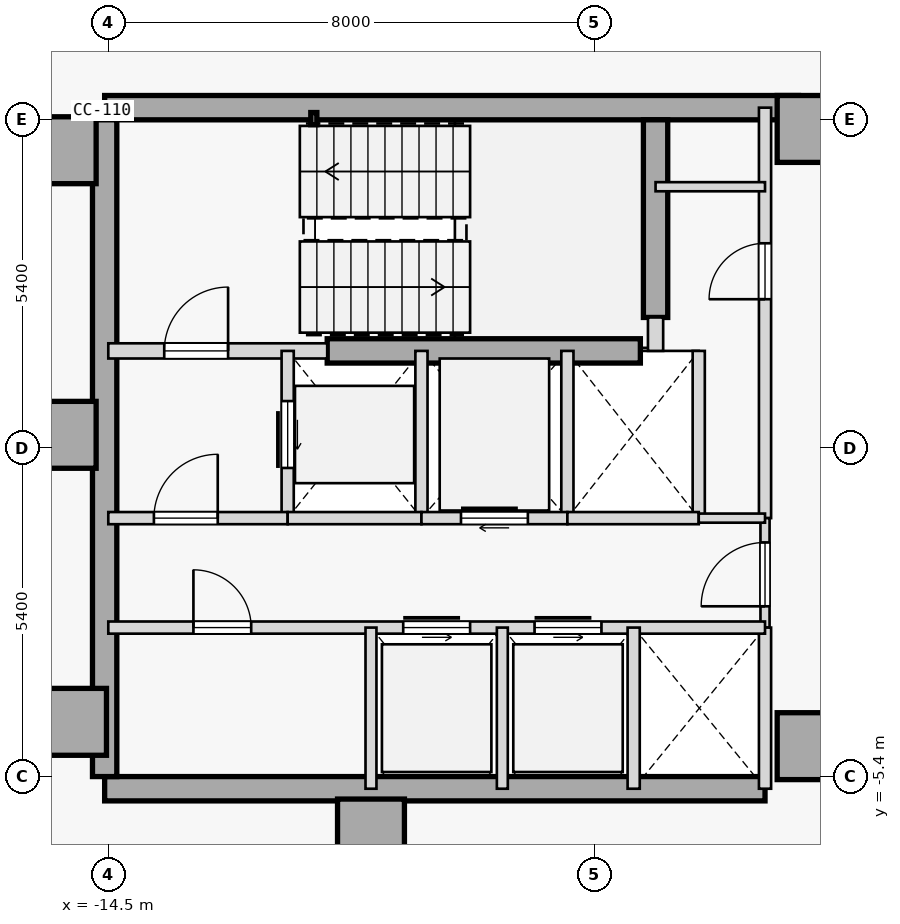
"""IFC4 building model, lengths in metres.
Left out: names, types, materials, properties, quantities, classifications, styles, units other than length and angle.
Written with IfcOpenShell. Run it as: python <this file> out.ifc"""

import sys

from ifc_helpers import new_model, si_unit, direction, frame, frame_2d, origin, origin_2d, place, context, subcontext, project, spatial, rectangle, hollow_rectangle, extrude, element, fill, save


model = new_model("IFC4")
c1 = context("Model", 3, precision=1e-05, world=origin(), true_north=direction((0.0, 1.0)))
c2 = subcontext(c1, "Body", "Model", "MODEL_VIEW")
j1 = project(units=[si_unit("LENGTHUNIT", "METRE"), si_unit("PLANEANGLEUNIT", "RADIAN")], contexts=[c1])
p1 = place(None, origin())
s1 = spatial("IfcSite", under=j1, at=p1, CompositionType="ELEMENT")
p2 = place(p1, origin())
s2 = spatial("IfcBuilding", under=s1, at=p2, CompositionType="ELEMENT")
p3 = place(p2, frame((0.0, 0.0, 135.5)))
s3 = spatial("IfcBuildingStorey", under=s2, at=p3, CompositionType="ELEMENT", Elevation=135.5)
for number, where, z_axis, x_axis in (
    (1, (-15.25, 4.9, 0.0), (0.0, 0.0, 1.0), (1.0, 0.0, 0.0)),
    (2, (-15.25, 0.22, 0.0), (0.0, 0.0, 1.0), (1.0, 0.0, 0.0)),
    (3, (-15.08, -4.5, 0.0), (0.0, 0.0, 1.0), (1.0, 0.0, 0.0)),
    (4, (-10.18, -6.32, 0.0), (0.0, 0.0, 1.0), (1.0, 0.0, 0.0)),
    (5, (-2.95, -4.9, 0.0), (0.0, 0.0, 1.0), (1.0, 0.0, 0.0)),
    (6, (-2.95, 5.25, 0.0), (0.0, 0.0, 1.0), (1.0, 0.0, 0.0)),
):
    element("IfcColumn", number, at=place(p3, frame(where, z_axis=z_axis, x_axis=x_axis)), inside=s3, PredefinedType="COLUMN", context=c2, shape_type="SweptSolid", body=[
        extrude(rectangle(XDim=1.1, YDim=1.1, at=origin_2d()), origin(), (0.0, 0.0, 1.0), 3.7),
    ])
p4 = place(p3, frame((-14.56, 5.6, 0.0), z_axis=(0.0, 0.0, 1.0), x_axis=(1.0, 0.0, 0.0)))
e7 = element("IfcWall", 7, at=p4, inside=s3, PredefinedType="SHEAR", context=c2, shape_type="SweptSolid", body=[
    extrude(rectangle(XDim=11.41, YDim=0.4, at=frame_2d((5.705, 0.0))), origin(), (0.0, 0.0, 1.0), 3.475),
])
p5 = place(p3, frame((-14.56, -5.6, 0.0), z_axis=(0.0, 0.0, 1.0), x_axis=(1.0, 0.0, 0.0)))
e8 = element("IfcWall", 8, at=p5, inside=s3, PredefinedType="SHEAR", context=c2, shape_type="SweptSolid", body=[
    extrude(rectangle(XDim=10.86, YDim=0.4, at=frame_2d((5.43, 0.0))), origin(), (0.0, 0.0, 1.0), 3.475),
])
p6 = place(p3, frame((-14.56, -5.4, 0.0), z_axis=(0.0, 0.0, 1.0), x_axis=(0.0, 1.0, 0.0)))
e9 = element("IfcWall", 9, at=p6, inside=s3, PredefinedType="SHEAR", context=c2, shape_type="SweptSolid", body=[
    extrude(rectangle(XDim=10.8, YDim=0.4, at=frame_2d((5.4, 0.0))), origin(), (0.0, 0.0, 1.0), 3.475),
])
p7 = place(p3, frame((-5.5, 2.15, 0.0), z_axis=(0.0, 0.0, 1.0), x_axis=(0.0, 1.0, 0.0)))
e10 = element("IfcWall", 10, at=p7, inside=s3, PredefinedType="SHEAR", context=c2, shape_type="SweptSolid", body=[
    extrude(rectangle(XDim=3.25, YDim=0.4, at=frame_2d((1.625, 0.0))), origin(), (0.0, 0.0, 1.0), 3.475),
])
p8 = place(p3, frame((-10.9, 1.6, 0.0), z_axis=(0.0, 0.0, 1.0), x_axis=(1.0, 0.0, 0.0)))
e11 = element("IfcWall", 11, at=p8, inside=s3, PredefinedType="SHEAR", context=c2, shape_type="SweptSolid", body=[
    extrude(rectangle(XDim=5.15, YDim=0.4, at=frame_2d((2.575, 0.0))), origin(), (0.0, 0.0, 1.0), 3.475),
])
p9 = place(p3, frame((-11.12, 5.42, 0.0), z_axis=(0.0, 0.0, 1.0), x_axis=(1.0, 0.0, 0.0)))
e12 = element("IfcColumn", 12, at=p9, inside=s3, PredefinedType="COLUMN", context=c2, shape_type="SweptSolid", body=[
    extrude(hollow_rectangle(XDim=0.1, YDim=0.2, WallThickness=0.008, at=origin_2d()), origin(), (0.0, 0.0, 1.0), 3.7),
])
p10 = place(p3, frame((-14.5, 1.6, 0.0), z_axis=(0.0, 0.0, 1.0), x_axis=(1.0, 0.0, 0.0)))
e13 = element("IfcWall", 13, at=p10, inside=s3, PredefinedType="STANDARD", context=c2, shape_type="SweptSolid", body=[
    extrude(rectangle(XDim=3.6, YDim=0.25, at=frame_2d((1.8, 0.0))), origin(), (0.0, 0.0, 1.0), 3.475),
])
p11 = place(p10, frame((0.92, 0.0, 0.0)))
e14 = element("IfcOpeningElement", 14, at=p11, cuts=e13, PredefinedType="OPENING", context=c2, shape_type="SweptSolid", body=[
    extrude(rectangle(XDim=1.05, YDim=2.15, at=frame_2d((0.525, 1.075))), frame((0.0, 0.135, 0.0), z_axis=(0.0, -1.0, 0.0), x_axis=(1.0, 0.0, 0.0)), (0.0, 0.0, 1.0), 0.27),
])
p12 = place(p3, frame((-5.5, 1.6, 0.0), z_axis=(0.0, 0.0, 1.0), x_axis=(0.0, 1.0, 0.0)))
e15 = element("IfcWall", 15, at=p12, inside=s3, PredefinedType="STANDARD", context=c2, shape_type="SweptSolid", body=[
    extrude(rectangle(XDim=0.55, YDim=0.25, at=frame_2d((0.275, 0.0))), origin(), (0.0, 0.0, 1.0), 3.475),
])
p13 = place(p3, frame((-3.7, -1.15, 0.0), z_axis=(0.0, 0.0, 1.0), x_axis=(0.0, 1.0, 0.0)))
e16 = element("IfcWall", 16, at=p13, inside=s3, PredefinedType="STANDARD", context=c2, shape_type="SweptSolid", body=[
    extrude(rectangle(XDim=6.75, YDim=0.2, at=frame_2d((3.375, 0.0))), origin(), (0.0, 0.0, 1.0), 3.475),
])
p14 = place(p13, frame((3.6, 0.0, 0.0)))
e17 = element("IfcOpeningElement", 17, at=p14, cuts=e16, PredefinedType="OPENING", context=c2, shape_type="SweptSolid", body=[
    extrude(rectangle(XDim=0.92, YDim=2.15, at=frame_2d((0.46, 1.075))), frame((0.0, 0.11, 0.0), z_axis=(0.0, -1.0, 0.0), x_axis=(1.0, 0.0, 0.0)), (0.0, 0.0, 1.0), 0.22),
])
p15 = place(p3, frame((-3.7, -2.95, 0.0), z_axis=(0.0, 0.0, 1.0), x_axis=(0.0, 1.0, 0.0)))
e18 = element("IfcWall", 18, at=p15, inside=s3, PredefinedType="PARTITIONING", context=c2, shape_type="SweptSolid", body=[
    extrude(rectangle(XDim=1.8, YDim=0.15, at=frame_2d((0.9, 0.0))), origin(), (0.0, 0.0, 1.0), 3.475),
])
p16 = place(p15, frame((0.35, 0.0, 0.0)))
e19 = element("IfcOpeningElement", 19, at=p16, cuts=e18, PredefinedType="OPENING", context=c2, shape_type="SweptSolid", body=[
    extrude(rectangle(XDim=1.05, YDim=2.18, at=frame_2d((0.525, 1.09))), frame((0.0, 0.085, 0.0), z_axis=(0.0, -1.0, 0.0), x_axis=(1.0, 0.0, 0.0)), (0.0, 0.0, 1.0), 0.17),
])
p17 = place(p3, frame((-3.7, -5.6, 0.0), z_axis=(0.0, 0.0, 1.0), x_axis=(0.0, 1.0, 0.0)))
e20 = element("IfcWall", 20, at=p17, inside=s3, PredefinedType="STANDARD", context=c2, shape_type="SweptSolid", body=[
    extrude(rectangle(XDim=2.65, YDim=0.2, at=frame_2d((1.325, 0.0))), origin(), (0.0, 0.0, 1.0), 3.475),
])
p18 = place(p3, frame((-11.55, -1.15, 0.0), z_axis=(0.0, 0.0, 1.0), x_axis=(0.0, 1.0, 0.0)))
e21 = element("IfcWall", 21, at=p18, inside=s3, PredefinedType="STANDARD", context=c2, shape_type="SweptSolid", body=[
    extrude(rectangle(XDim=2.75, YDim=0.2, at=frame_2d((1.375, 0.0))), origin(), (0.0, 0.0, 1.0), 3.475),
])
p19 = place(p18, frame((0.825, 0.0, 0.0)))
e22 = element("IfcOpeningElement", 22, at=p19, cuts=e21, PredefinedType="OPENING", context=c2, shape_type="SweptSolid", body=[
    extrude(rectangle(XDim=1.1, YDim=2.15, at=frame_2d((0.55, 1.075))), frame((0.0, 0.11, 0.0), z_axis=(0.0, -1.0, 0.0), x_axis=(1.0, 0.0, 0.0)), (0.0, 0.0, 1.0), 0.22),
])
p20 = place(p3, frame((-9.35, -1.15, 0.0), z_axis=(0.0, 0.0, 1.0), x_axis=(0.0, 1.0, 0.0)))
e23 = element("IfcWall", 23, at=p20, inside=s3, PredefinedType="STANDARD", context=c2, shape_type="SweptSolid", body=[
    extrude(rectangle(XDim=2.75, YDim=0.2, at=frame_2d((1.375, 0.0))), origin(), (0.0, 0.0, 1.0), 3.475),
])
p21 = place(p3, frame((-14.5, -1.15, 0.0), z_axis=(0.0, 0.0, 1.0), x_axis=(1.0, 0.0, 0.0)))
e24 = element("IfcWall", 24, at=p21, inside=s3, PredefinedType="STANDARD", context=c2, shape_type="SweptSolid", body=[
    extrude(rectangle(XDim=2.95, YDim=0.2, at=frame_2d((1.475, 0.0))), origin(), (0.0, 0.0, 1.0), 3.475),
])
p22 = place(p21, frame((0.75, 0.0, 0.0)))
e25 = element("IfcOpeningElement", 25, at=p22, cuts=e24, PredefinedType="OPENING", context=c2, shape_type="SweptSolid", body=[
    extrude(rectangle(XDim=1.05, YDim=2.18, at=frame_2d((0.525, 1.09))), frame((0.0, 0.11, 0.0), z_axis=(0.0, -1.0, 0.0), x_axis=(1.0, 0.0, 0.0)), (0.0, 0.0, 1.0), 0.22),
])
p23 = place(p3, frame((-11.55, -1.15, 0.0), z_axis=(0.0, 0.0, 1.0), x_axis=(1.0, 0.0, 0.0)))
e26 = element("IfcWall", 26, at=p23, inside=s3, PredefinedType="STANDARD", context=c2, shape_type="SweptSolid", body=[
    extrude(rectangle(XDim=2.2, YDim=0.2, at=frame_2d((1.1, 0.0))), origin(), (0.0, 0.0, 1.0), 3.475),
])
p24 = place(p3, frame((-6.95, -1.15, 0.0), z_axis=(0.0, 0.0, 1.0), x_axis=(0.0, 1.0, 0.0)))
e27 = element("IfcWall", 27, at=p24, inside=s3, PredefinedType="STANDARD", context=c2, shape_type="SweptSolid", body=[
    extrude(rectangle(XDim=2.75, YDim=0.2, at=frame_2d((1.375, 0.0))), origin(), (0.0, 0.0, 1.0), 3.475),
])
p25 = place(p3, frame((-9.35, -1.15, 0.0), z_axis=(0.0, 0.0, 1.0), x_axis=(1.0, 0.0, 0.0)))
e28 = element("IfcWall", 28, at=p25, inside=s3, PredefinedType="STANDARD", context=c2, shape_type="SweptSolid", body=[
    extrude(rectangle(XDim=2.4, YDim=0.2, at=frame_2d((1.2, 0.0))), origin(), (0.0, 0.0, 1.0), 3.475),
])
p26 = place(p25, frame((0.65, 0.0, 0.0)))
e29 = element("IfcOpeningElement", 29, at=p26, cuts=e28, PredefinedType="OPENING", context=c2, shape_type="SweptSolid", body=[
    extrude(rectangle(XDim=1.1, YDim=2.15, at=frame_2d((0.55, 1.075))), frame((0.0, 0.11, 0.0), z_axis=(0.0, -1.0, 0.0), x_axis=(1.0, 0.0, 0.0)), (0.0, 0.0, 1.0), 0.22),
])
p27 = place(p3, frame((-4.79, -1.15, 0.0), z_axis=(0.0, 0.0, 1.0), x_axis=(0.0, 1.0, 0.0)))
e30 = element("IfcWall", 30, at=p27, inside=s3, PredefinedType="STANDARD", context=c2, shape_type="SweptSolid", body=[
    extrude(rectangle(XDim=2.75, YDim=0.2, at=frame_2d((1.375, 0.0))), origin(), (0.0, 0.0, 1.0), 3.475),
])
p28 = place(p3, frame((-6.95, -1.15, 0.0), z_axis=(0.0, 0.0, 1.0), x_axis=(1.0, 0.0, 0.0)))
e31 = element("IfcWall", 31, at=p28, inside=s3, PredefinedType="STANDARD", context=c2, shape_type="SweptSolid", body=[
    extrude(rectangle(XDim=2.16, YDim=0.2, at=frame_2d((1.08, 0.0))), origin(), (0.0, 0.0, 1.0), 3.475),
])
p29 = place(p3, frame((-4.79, -1.15, 0.0), z_axis=(0.0, 0.0, 1.0), x_axis=(1.0, 0.0, 0.0)))
e32 = element("IfcWall", 32, at=p29, inside=s3, PredefinedType="PARTITIONING", context=c2, shape_type="SweptSolid", body=[
    extrude(rectangle(XDim=1.09, YDim=0.15, at=frame_2d((0.545, 0.0))), origin(), (0.0, 0.0, 1.0), 3.475),
])
p30 = place(p3, frame((-14.5, -2.95, 0.0), z_axis=(0.0, 0.0, 1.0), x_axis=(1.0, 0.0, 0.0)))
e33 = element("IfcWall", 33, at=p30, inside=s3, PredefinedType="STANDARD", context=c2, shape_type="SweptSolid", body=[
    extrude(rectangle(XDim=10.8, YDim=0.2, at=frame_2d((5.4, 0.0))), origin(), (0.0, 0.0, 1.0), 3.475),
])
p31 = place(p30, frame((4.85, 0.0, 0.0)))
e34 = element("IfcOpeningElement", 34, at=p31, cuts=e33, PredefinedType="OPENING", context=c2, shape_type="SweptSolid", body=[
    extrude(rectangle(XDim=1.1, YDim=2.15, at=frame_2d((0.55, 1.075))), frame((0.0, 0.11, 0.0), z_axis=(0.0, -1.0, 0.0), x_axis=(1.0, 0.0, 0.0)), (0.0, 0.0, 1.0), 0.22),
])
p32 = place(p30, frame((7.01, 0.0, 0.0)))
e35 = element("IfcOpeningElement", 35, at=p32, cuts=e33, PredefinedType="OPENING", context=c2, shape_type="SweptSolid", body=[
    extrude(rectangle(XDim=1.1, YDim=2.15, at=frame_2d((0.55, 1.075))), frame((0.0, 0.11, 0.0), z_axis=(0.0, -1.0, 0.0), x_axis=(1.0, 0.0, 0.0)), (0.0, 0.0, 1.0), 0.22),
])
p33 = place(p30, frame((1.4, 0.0, 0.0)))
e36 = element("IfcOpeningElement", 36, at=p33, cuts=e33, PredefinedType="OPENING", context=c2, shape_type="SweptSolid", body=[
    extrude(rectangle(XDim=0.95, YDim=2.15, at=frame_2d((0.475, 1.075))), frame((0.0, 0.11, 0.0), z_axis=(0.0, -1.0, 0.0), x_axis=(1.0, 0.0, 0.0)), (0.0, 0.0, 1.0), 0.22),
])
p34 = place(p3, frame((-5.86, -5.6, 0.0), z_axis=(0.0, 0.0, 1.0), x_axis=(0.0, 1.0, 0.0)))
e37 = element("IfcWall", 37, at=p34, inside=s3, PredefinedType="STANDARD", context=c2, shape_type="SweptSolid", body=[
    extrude(rectangle(XDim=2.65, YDim=0.2, at=frame_2d((1.325, 0.0))), origin(), (0.0, 0.0, 1.0), 3.475),
])
for number, where, z_axis, x_axis in (
    (38, (-10.18, -5.6, 0.0), (0.0, 0.0, 1.0), (0.0, 1.0, 0.0)),
    (39, (-8.02, -5.6, 0.0), (0.0, 0.0, 1.0), (0.0, 1.0, 0.0)),
):
    element("IfcWall", number, at=place(p3, frame(where, z_axis=z_axis, x_axis=x_axis)), inside=s3, PredefinedType="STANDARD", context=c2, shape_type="SweptSolid", body=[
        extrude(rectangle(XDim=2.65, YDim=0.18, at=frame_2d((1.325, 0.0))), origin(), (0.0, 0.0, 1.0), 3.475),
    ])
p35 = place(p3, frame((-5.5, 4.3, 0.0), z_axis=(0.0, 0.0, 1.0), x_axis=(1.0, 0.0, 0.0)))
e40 = element("IfcWall", 40, at=p35, inside=s3, PredefinedType="PARTITIONING", context=c2, shape_type="SweptSolid", body=[
    extrude(rectangle(XDim=1.8, YDim=0.15, at=frame_2d((0.9, 0.0))), origin(), (0.0, 0.0, 1.0), 3.475),
])
p36 = place(p11, origin())
e41 = element("IfcDoor", 41, at=p36, inside=s3, OperationType="SINGLE_SWING_RIGHT", PredefinedType="DOOR", context=c2, shape_type="SweptSolid", body=[
    extrude(rectangle(XDim=1.05, YDim=2.15, at=frame_2d((0.525, 1.075))), frame((0.0, 0.025, 0.0), z_axis=(0.0, -1.0, 0.0), x_axis=(1.0, 0.0, 0.0)), (0.0, 0.0, 1.0), 0.05),
])
fill(e14, e41)
p37 = place(p22, origin())
e42 = element("IfcDoor", 42, at=p37, inside=s3, OperationType="SINGLE_SWING_RIGHT", PredefinedType="DOOR", context=c2, shape_type="SweptSolid", body=[
    extrude(rectangle(XDim=1.05, YDim=2.18, at=frame_2d((0.525, 1.09))), frame((0.0, 0.025, 0.0), z_axis=(0.0, -1.0, 0.0), x_axis=(1.0, 0.0, 0.0)), (0.0, 0.0, 1.0), 0.05),
])
fill(e25, e42)
p38 = place(p16, origin())
e43 = element("IfcDoor", 43, at=p38, inside=s3, OperationType="SINGLE_SWING_LEFT", PredefinedType="DOOR", context=c2, shape_type="SweptSolid", body=[
    extrude(rectangle(XDim=1.05, YDim=2.18, at=frame_2d((0.525, 1.09))), frame((0.0, 0.025, 0.0), z_axis=(0.0, -1.0, 0.0), x_axis=(1.0, 0.0, 0.0)), (0.0, 0.0, 1.0), 0.05),
])
fill(e19, e43)
p39 = place(p19, origin())
e44 = element("IfcDoor", 44, at=p39, inside=s3, OperationType="SLIDING_TO_RIGHT", PredefinedType="DOOR", context=c2, shape_type="SweptSolid", body=[
    extrude(rectangle(XDim=1.1, YDim=2.15, at=frame_2d((0.55, 1.075))), frame((0.0, 0.025, 0.0), z_axis=(0.0, -1.0, 0.0), x_axis=(1.0, 0.0, 0.0)), (0.0, 0.0, 1.0), 0.05),
])
fill(e22, e44)
p40 = place(p26, origin())
e45 = element("IfcDoor", 45, at=p40, inside=s3, OperationType="SLIDING_TO_RIGHT", PredefinedType="DOOR", context=c2, shape_type="SweptSolid", body=[
    extrude(rectangle(XDim=1.1, YDim=2.15, at=frame_2d((0.55, 1.075))), frame((0.0, 0.025, 0.0), z_axis=(0.0, -1.0, 0.0), x_axis=(1.0, 0.0, 0.0)), (0.0, 0.0, 1.0), 0.05),
])
fill(e29, e45)
p41 = place(p31, origin())
e46 = element("IfcDoor", 46, at=p41, inside=s3, OperationType="SLIDING_TO_LEFT", PredefinedType="DOOR", context=c2, shape_type="SweptSolid", body=[
    extrude(rectangle(XDim=1.1, YDim=2.15, at=frame_2d((0.55, 1.075))), frame((0.0, 0.025, 0.0), z_axis=(0.0, -1.0, 0.0), x_axis=(1.0, 0.0, 0.0)), (0.0, 0.0, 1.0), 0.05),
])
fill(e34, e46)
p42 = place(p32, origin())
e47 = element("IfcDoor", 47, at=p42, inside=s3, OperationType="SLIDING_TO_LEFT", PredefinedType="DOOR", context=c2, shape_type="SweptSolid", body=[
    extrude(rectangle(XDim=1.1, YDim=2.15, at=frame_2d((0.55, 1.075))), frame((0.0, 0.025, 0.0), z_axis=(0.0, -1.0, 0.0), x_axis=(1.0, 0.0, 0.0)), (0.0, 0.0, 1.0), 0.05),
])
fill(e35, e47)
p43 = place(p33, origin())
e48 = element("IfcDoor", 48, at=p43, inside=s3, OperationType="SINGLE_SWING_LEFT", PredefinedType="DOOR", context=c2, shape_type="SweptSolid", body=[
    extrude(rectangle(XDim=0.95, YDim=2.15, at=frame_2d((0.475, 1.075))), frame((0.0, 0.025, 0.0), z_axis=(0.0, -1.0, 0.0), x_axis=(1.0, 0.0, 0.0)), (0.0, 0.0, 1.0), 0.05),
])
fill(e36, e48)
p44 = place(p14, origin())
e49 = element("IfcDoor", 49, at=p44, inside=s3, OperationType="SINGLE_SWING_LEFT", PredefinedType="DOOR", context=c2, shape_type="SweptSolid", body=[
    extrude(rectangle(XDim=0.92, YDim=2.15, at=frame_2d((0.46, 1.075))), frame((0.0, 0.025, 0.0), z_axis=(0.0, -1.0, 0.0), x_axis=(1.0, 0.0, 0.0)), (0.0, 0.0, 1.0), 0.05),
])
fill(e17, e49)
save(model, sys.argv[1])
